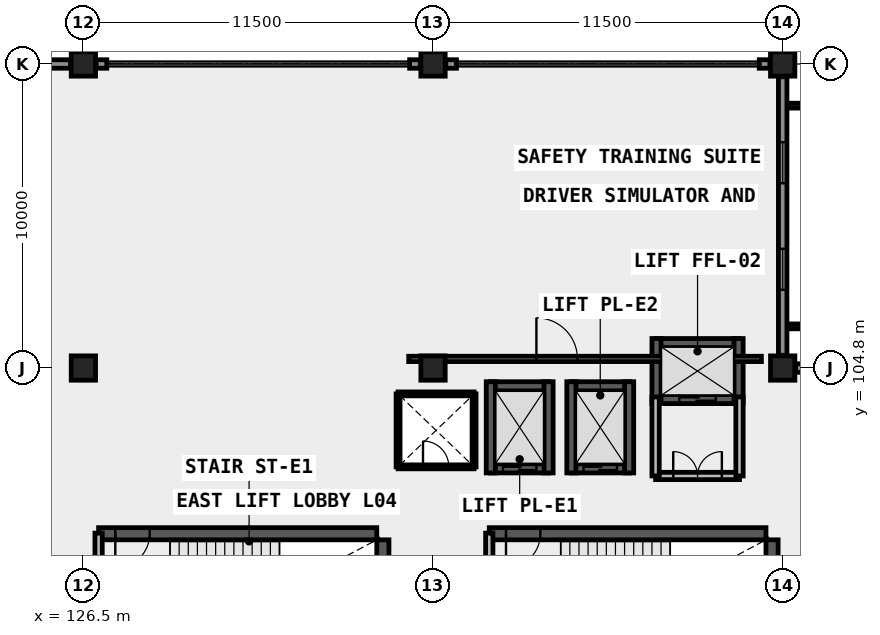
"""IFC4 building model, lengths in metres.
Left out: names, types, materials, properties, quantities, classifications, styles, units other than length and angle.
Written with IfcOpenShell. Run it as: python <this file> out.ifc"""

import sys

from ifc_helpers import new_model, si_unit, direction, frame, frame_2d, origin, origin_2d, place, context, subcontext, project, spatial, rectangle, extrude, element, fill, save


model = new_model("IFC4")
c1 = context("Model", 3, precision=1e-05, world=origin(), true_north=direction((0.0, 1.0)))
c2 = subcontext(c1, "Body", "Model", "MODEL_VIEW")
j1 = project(units=[si_unit("LENGTHUNIT", "METRE"), si_unit("PLANEANGLEUNIT", "RADIAN")], contexts=[c1])
p1 = place(None, origin())
s1 = spatial("IfcSite", under=j1, at=p1, CompositionType="ELEMENT")
p2 = place(p1, origin())
s2 = spatial("IfcBuilding", under=s1, at=p2, CompositionType="ELEMENT")
p3 = place(p2, frame((0.0, 0.0, 18.3)))
s3 = spatial("IfcBuildingStorey", under=s2, at=p3, CompositionType="ELEMENT", Elevation=18.3)
for number, where, z_axis, x_axis in (
    (1, (126.5, 104.8, 0.0), (0.0, 0.0, 1.0), (1.0, 0.0, 0.0)),
    (2, (126.5, 114.8, 0.0), (0.0, 0.0, 1.0), (1.0, 0.0, 0.0)),
    (3, (138.0, 104.8, 0.0), (0.0, 0.0, 1.0), (1.0, 0.0, 0.0)),
    (4, (138.0, 114.8, 0.0), (0.0, 0.0, 1.0), (1.0, 0.0, 0.0)),
    (5, (149.5, 104.8, 0.0), (0.0, 0.0, 1.0), (1.0, 0.0, 0.0)),
    (6, (149.5, 114.8, 0.0), (0.0, 0.0, 1.0), (1.0, 0.0, 0.0)),
):
    element("IfcColumn", number, at=place(p3, frame(where, z_axis=z_axis, x_axis=x_axis)), inside=s3, PredefinedType="COLUMN", context=c2, shape_type="SweptSolid", body=[
        extrude(rectangle(XDim=0.8, YDim=0.8, at=origin_2d()), origin(), (0.0, 0.0, 1.0), 4.16),
    ])
p4 = place(p3, frame((145.35, 103.78, 0.0), z_axis=(0.0, 0.0, 1.0), x_axis=(1.0, 0.0, 0.0)))
e7 = element("IfcWall", 7, at=p4, inside=s3, PredefinedType="SHEAR", context=c2, shape_type="SweptSolid", body=[
    extrude(rectangle(XDim=2.7, YDim=0.3, at=frame_2d((1.35, 0.0))), origin(), (0.0, 0.0, 1.0), 4.16),
])
p5 = place(p4, frame((0.75, 0.0, 0.0)))
e8 = element("IfcOpeningElement", 8, at=p5, cuts=e7, PredefinedType="OPENING", context=c2, shape_type="SweptSolid", body=[
    extrude(rectangle(XDim=1.2, YDim=2.15, at=frame_2d((0.6, 1.075))), frame((0.0, 0.16, 0.0), z_axis=(0.0, -1.0, 0.0), x_axis=(1.0, 0.0, 0.0)), (0.0, 0.0, 1.0), 0.32),
])
p6 = place(p3, frame((145.35, 105.62, 0.0), z_axis=(0.0, 0.0, 1.0), x_axis=(1.0, 0.0, 0.0)))
e9 = element("IfcWall", 9, at=p6, inside=s3, PredefinedType="SHEAR", context=c2, shape_type="SweptSolid", body=[
    extrude(rectangle(XDim=2.7, YDim=0.3, at=frame_2d((1.35, 0.0))), origin(), (0.0, 0.0, 1.0), 4.16),
])
for number, where, z_axis, x_axis in (
    (10, (145.35, 103.63, 0.0), (0.0, 0.0, 1.0), (0.0, 1.0, 0.0)),
    (11, (148.05, 103.63, 0.0), (0.0, 0.0, 1.0), (0.0, 1.0, 0.0)),
):
    element("IfcWall", number, at=place(p3, frame(where, z_axis=z_axis, x_axis=x_axis)), inside=s3, PredefinedType="SHEAR", context=c2, shape_type="SweptSolid", body=[
        extrude(rectangle(XDim=2.14, YDim=0.3, at=frame_2d((1.07, 0.0))), origin(), (0.0, 0.0, 1.0), 4.16),
    ])
p7 = place(p3, frame((139.9, 101.5, 0.0), z_axis=(0.0, 0.0, 1.0), x_axis=(1.0, 0.0, 0.0)))
e12 = element("IfcWall", 12, at=p7, inside=s3, PredefinedType="SHEAR", context=c2, shape_type="SweptSolid", body=[
    extrude(rectangle(XDim=1.9, YDim=0.3, at=frame_2d((0.95, 0.0))), origin(), (0.0, 0.0, 1.0), 4.16),
])
p8 = place(p7, frame((0.4, 0.0, 0.0)))
e13 = element("IfcOpeningElement", 13, at=p8, cuts=e12, PredefinedType="OPENING", context=c2, shape_type="SweptSolid", body=[
    extrude(rectangle(XDim=1.1, YDim=2.15, at=frame_2d((0.55, 1.075))), frame((0.0, 0.16, 0.0), z_axis=(0.0, -1.0, 0.0), x_axis=(1.0, 0.0, 0.0)), (0.0, 0.0, 1.0), 0.32),
])
p9 = place(p3, frame((139.9, 104.2, 0.0), z_axis=(0.0, 0.0, 1.0), x_axis=(1.0, 0.0, 0.0)))
e14 = element("IfcWall", 14, at=p9, inside=s3, PredefinedType="SHEAR", context=c2, shape_type="SweptSolid", body=[
    extrude(rectangle(XDim=1.9, YDim=0.3, at=frame_2d((0.95, 0.0))), origin(), (0.0, 0.0, 1.0), 4.16),
])
for number, where, z_axis, x_axis in (
    (15, (139.9, 101.35, 0.0), (0.0, 0.0, 1.0), (0.0, 1.0, 0.0)),
    (16, (141.8, 101.35, 0.0), (0.0, 0.0, 1.0), (0.0, 1.0, 0.0)),
):
    element("IfcWall", number, at=place(p3, frame(where, z_axis=z_axis, x_axis=x_axis)), inside=s3, PredefinedType="SHEAR", context=c2, shape_type="SweptSolid", body=[
        extrude(rectangle(XDim=3.0, YDim=0.3, at=frame_2d((1.5, 0.0))), origin(), (0.0, 0.0, 1.0), 4.16),
    ])
p10 = place(p3, frame((142.55, 101.5, 0.0), z_axis=(0.0, 0.0, 1.0), x_axis=(1.0, 0.0, 0.0)))
e17 = element("IfcWall", 17, at=p10, inside=s3, PredefinedType="SHEAR", context=c2, shape_type="SweptSolid", body=[
    extrude(rectangle(XDim=1.9, YDim=0.3, at=frame_2d((0.95, 0.0))), origin(), (0.0, 0.0, 1.0), 4.16),
])
p11 = place(p10, frame((0.4, 0.0, 0.0)))
e18 = element("IfcOpeningElement", 18, at=p11, cuts=e17, PredefinedType="OPENING", context=c2, shape_type="SweptSolid", body=[
    extrude(rectangle(XDim=1.1, YDim=2.15, at=frame_2d((0.55, 1.075))), frame((0.0, 0.16, 0.0), z_axis=(0.0, -1.0, 0.0), x_axis=(1.0, 0.0, 0.0)), (0.0, 0.0, 1.0), 0.32),
])
p12 = place(p3, frame((142.55, 104.2, 0.0), z_axis=(0.0, 0.0, 1.0), x_axis=(1.0, 0.0, 0.0)))
e19 = element("IfcWall", 19, at=p12, inside=s3, PredefinedType="SHEAR", context=c2, shape_type="SweptSolid", body=[
    extrude(rectangle(XDim=1.9, YDim=0.3, at=frame_2d((0.95, 0.0))), origin(), (0.0, 0.0, 1.0), 4.16),
])
for number, where, z_axis, x_axis in (
    (20, (142.55, 101.35, 0.0), (0.0, 0.0, 1.0), (0.0, 1.0, 0.0)),
    (21, (144.45, 101.35, 0.0), (0.0, 0.0, 1.0), (0.0, 1.0, 0.0)),
):
    element("IfcWall", number, at=place(p3, frame(where, z_axis=z_axis, x_axis=x_axis)), inside=s3, PredefinedType="SHEAR", context=c2, shape_type="SweptSolid", body=[
        extrude(rectangle(XDim=3.0, YDim=0.3, at=frame_2d((1.5, 0.0))), origin(), (0.0, 0.0, 1.0), 4.16),
    ])
p13 = place(p3, frame((127.0, 99.35, 0.0), z_axis=(0.0, 0.0, 1.0), x_axis=(1.0, 0.0, 0.0)))
e22 = element("IfcWall", 22, at=p13, inside=s3, PredefinedType="SHEAR", context=c2, shape_type="SweptSolid", body=[
    extrude(rectangle(XDim=9.15, YDim=0.4, at=frame_2d((4.575, 0.0))), origin(), (0.0, 0.0, 1.0), 4.16),
])
p14 = place(p13, frame((0.55, 0.0, 0.0)))
e23 = element("IfcOpeningElement", 23, at=p14, cuts=e22, PredefinedType="OPENING", context=c2, shape_type="SweptSolid", body=[
    extrude(rectangle(XDim=1.13, YDim=2.15, at=frame_2d((0.565, 1.075))), frame((0.0, 0.21, 0.0), z_axis=(0.0, -1.0, 0.0), x_axis=(1.0, 0.0, 0.0)), (0.0, 0.0, 1.0), 0.42),
])
p15 = place(p3, frame((136.35, 95.55, 0.0), z_axis=(0.0, 0.0, 1.0), x_axis=(0.0, 1.0, 0.0)))
e24 = element("IfcWall", 24, at=p15, inside=s3, PredefinedType="SHEAR", context=c2, shape_type="SweptSolid", body=[
    extrude(rectangle(XDim=3.6, YDim=0.4, at=frame_2d((1.8, 0.0))), origin(), (0.0, 0.0, 1.0), 4.16),
])
p16 = place(p3, frame((139.85, 99.35, 0.0), z_axis=(0.0, 0.0, 1.0), x_axis=(1.0, 0.0, 0.0)))
e25 = element("IfcWall", 25, at=p16, inside=s3, PredefinedType="SHEAR", context=c2, shape_type="SweptSolid", body=[
    extrude(rectangle(XDim=9.1, YDim=0.4, at=frame_2d((4.55, 0.0))), origin(), (0.0, 0.0, 1.0), 4.16),
])
p17 = place(p16, frame((0.55, 0.0, 0.0)))
e26 = element("IfcOpeningElement", 26, at=p17, cuts=e25, PredefinedType="OPENING", context=c2, shape_type="SweptSolid", body=[
    extrude(rectangle(XDim=1.13, YDim=2.15, at=frame_2d((0.565, 1.075))), frame((0.0, 0.21, 0.0), z_axis=(0.0, -1.0, 0.0), x_axis=(1.0, 0.0, 0.0)), (0.0, 0.0, 1.0), 0.42),
])
p18 = place(p3, frame((149.15, 95.22, 0.0), z_axis=(0.0, 0.0, 1.0), x_axis=(0.0, 1.0, 0.0)))
e27 = element("IfcWall", 27, at=p18, inside=s3, PredefinedType="SHEAR", context=c2, shape_type="SweptSolid", body=[
    extrude(rectangle(XDim=3.93, YDim=0.4, at=frame_2d((1.965, 0.0))), origin(), (0.0, 0.0, 1.0), 4.16),
])
p19 = place(p3, frame((149.92, 104.8, 0.0), z_axis=(0.0, 0.0, 1.0), x_axis=(1.0, 0.0, 0.0)))
e28 = element("IfcWall", 28, at=p19, inside=s3, PredefinedType="SOLIDWALL", context=c2, shape_type="SweptSolid", body=[
    extrude(rectangle(XDim=10.66, YDim=0.28, at=frame_2d((5.33, 0.0))), origin(), (0.0, 0.0, 1.0), 3.1),
])
p20 = place(p19, frame((2.587, 0.0, 0.85)))
e29 = element("IfcOpeningElement", 29, at=p20, cuts=e28, PredefinedType="OPENING", context=c2, shape_type="SweptSolid", body=[
    extrude(rectangle(XDim=1.45, YDim=1.75, at=frame_2d((0.725, 0.875))), frame((0.0, 0.15, 0.0), z_axis=(0.0, -1.0, 0.0), x_axis=(1.0, 0.0, 0.0)), (0.0, 0.0, 1.0), 0.3),
])
p21 = place(p19, frame((6.623, 0.0, 0.85)))
e30 = element("IfcOpeningElement", 30, at=p21, cuts=e28, PredefinedType="OPENING", context=c2, shape_type="SweptSolid", body=[
    extrude(rectangle(XDim=1.45, YDim=1.75, at=frame_2d((0.725, 0.875))), frame((0.0, 0.15, 0.0), z_axis=(0.0, -1.0, 0.0), x_axis=(1.0, 0.0, 0.0)), (0.0, 0.0, 1.0), 0.3),
])
p22 = place(p3, frame((149.5, 105.22, 0.0), z_axis=(0.0, 0.0, 1.0), x_axis=(0.0, 1.0, 0.0)))
e31 = element("IfcWall", 31, at=p22, inside=s3, PredefinedType="SOLIDWALL", context=c2, shape_type="SweptSolid", body=[
    extrude(rectangle(XDim=9.16, YDim=0.28, at=frame_2d((4.58, 0.0))), origin(), (0.0, 0.0, 1.0), 3.1),
])
p23 = place(p22, frame((2.153, 0.0, 0.85)))
e32 = element("IfcOpeningElement", 32, at=p23, cuts=e31, PredefinedType="OPENING", context=c2, shape_type="SweptSolid", body=[
    extrude(rectangle(XDim=1.35, YDim=1.65, at=frame_2d((0.675, 0.825))), frame((0.0, 0.15, 0.0), z_axis=(0.0, -1.0, 0.0), x_axis=(1.0, 0.0, 0.0)), (0.0, 0.0, 1.0), 0.3),
])
p24 = place(p22, frame((5.657, 0.0, 0.85)))
e33 = element("IfcOpeningElement", 33, at=p24, cuts=e31, PredefinedType="OPENING", context=c2, shape_type="SweptSolid", body=[
    extrude(rectangle(XDim=1.35, YDim=1.65, at=frame_2d((0.675, 0.825))), frame((0.0, 0.15, 0.0), z_axis=(0.0, -1.0, 0.0), x_axis=(1.0, 0.0, 0.0)), (0.0, 0.0, 1.0), 0.3),
])
p25 = place(p3, frame((115.42, 114.8, 0.0), z_axis=(0.0, 0.0, 1.0), x_axis=(1.0, 0.0, 0.0)))
e34 = element("IfcWall", 34, at=p25, inside=s3, PredefinedType="SOLIDWALL", context=c2, shape_type="SweptSolid", body=[
    extrude(rectangle(XDim=10.66, YDim=0.28, at=frame_2d((5.33, 0.0))), origin(), (0.0, 0.0, 1.0), 3.1),
])
p26 = place(p25, frame((2.587, 0.0, 0.85)))
e35 = element("IfcOpeningElement", 35, at=p26, cuts=e34, PredefinedType="OPENING", context=c2, shape_type="SweptSolid", body=[
    extrude(rectangle(XDim=1.45, YDim=1.75, at=frame_2d((0.725, 0.875))), frame((0.0, 0.15, 0.0), z_axis=(0.0, -1.0, 0.0), x_axis=(1.0, 0.0, 0.0)), (0.0, 0.0, 1.0), 0.3),
])
p27 = place(p25, frame((6.623, 0.0, 0.85)))
e36 = element("IfcOpeningElement", 36, at=p27, cuts=e34, PredefinedType="OPENING", context=c2, shape_type="SweptSolid", body=[
    extrude(rectangle(XDim=1.45, YDim=1.75, at=frame_2d((0.725, 0.875))), frame((0.0, 0.15, 0.0), z_axis=(0.0, -1.0, 0.0), x_axis=(1.0, 0.0, 0.0)), (0.0, 0.0, 1.0), 0.3),
])
for number, where, z_axis, x_axis in (
    (37, (126.92, 114.8, 0.0), (0.0, 0.0, 1.0), (1.0, 0.0, 0.0)),
    (38, (137.23, 114.8, 0.0), (0.0, 0.0, 1.0), (1.0, 0.0, 0.0)),
    (39, (138.42, 114.8, 0.0), (0.0, 0.0, 1.0), (1.0, 0.0, 0.0)),
    (40, (148.73, 114.8, 0.0), (0.0, 0.0, 1.0), (1.0, 0.0, 0.0)),
):
    element("IfcWall", number, at=place(p3, frame(where, z_axis=z_axis, x_axis=x_axis)), inside=s3, PredefinedType="SOLIDWALL", context=c2, shape_type="SweptSolid", body=[
        extrude(rectangle(XDim=0.35, YDim=0.28, at=frame_2d((0.175, 0.0))), origin(), (0.0, 0.0, 1.0), 3.89),
    ])
p28 = place(p3, frame((127.0, 95.33, 0.0), z_axis=(0.0, 0.0, 1.0), x_axis=(0.0, 1.0, 0.0)))
e41 = element("IfcWall", 41, at=p28, inside=s3, PredefinedType="SOLIDWALL", context=c2, shape_type="SweptSolid", body=[
    extrude(rectangle(XDim=4.04, YDim=0.24, at=frame_2d((2.02, 0.0))), origin(), (0.0, 0.0, 1.0), 3.88),
])
p29 = place(p28, frame((1.45, 0.0, 0.0)))
e42 = element("IfcOpeningElement", 42, at=p29, cuts=e41, PredefinedType="OPENING", context=c2, shape_type="SweptSolid", body=[
    extrude(rectangle(XDim=1.13, YDim=2.15, at=frame_2d((0.565, 1.075))), frame((0.0, 0.13, 0.0), z_axis=(0.0, -1.0, 0.0), x_axis=(1.0, 0.0, 0.0)), (0.0, 0.0, 1.0), 0.26),
])
p30 = place(p3, frame((139.85, 95.33, 0.0), z_axis=(0.0, 0.0, 1.0), x_axis=(0.0, 1.0, 0.0)))
e43 = element("IfcWall", 43, at=p30, inside=s3, PredefinedType="SOLIDWALL", context=c2, shape_type="SweptSolid", body=[
    extrude(rectangle(XDim=4.04, YDim=0.24, at=frame_2d((2.02, 0.0))), origin(), (0.0, 0.0, 1.0), 3.88),
])
p31 = place(p30, frame((1.45, 0.0, 0.0)))
e44 = element("IfcOpeningElement", 44, at=p31, cuts=e43, PredefinedType="OPENING", context=c2, shape_type="SweptSolid", body=[
    extrude(rectangle(XDim=1.13, YDim=2.15, at=frame_2d((0.565, 1.075))), frame((0.0, 0.13, 0.0), z_axis=(0.0, -1.0, 0.0), x_axis=(1.0, 0.0, 0.0)), (0.0, 0.0, 1.0), 0.26),
])
p32 = place(p3, frame((145.32, 101.25, 0.0), z_axis=(0.0, 0.0, 1.0), x_axis=(1.0, 0.0, 0.0)))
e45 = element("IfcWall", 45, at=p32, inside=s3, PredefinedType="SOLIDWALL", context=c2, shape_type="SweptSolid", body=[
    extrude(rectangle(XDim=2.76, YDim=0.24, at=frame_2d((1.38, 0.0))), origin(), (0.0, 0.0, 1.0), 3.88),
])
p33 = place(p32, frame((0.58, 0.0, 0.0)))
e46 = element("IfcOpeningElement", 46, at=p33, cuts=e45, PredefinedType="OPENING", context=c2, shape_type="SweptSolid", body=[
    extrude(rectangle(XDim=1.6, YDim=2.15, at=frame_2d((0.8, 1.075))), frame((0.0, 0.13, 0.0), z_axis=(0.0, -1.0, 0.0), x_axis=(1.0, 0.0, 0.0)), (0.0, 0.0, 1.0), 0.26),
])
for number, where, z_axis, x_axis in (
    (47, (145.32, 101.25, 0.0), (0.0, 0.0, 1.0), (0.0, 1.0, 0.0)),
    (48, (148.08, 101.25, 0.0), (0.0, 0.0, 1.0), (0.0, 1.0, 0.0)),
):
    element("IfcWall", number, at=place(p3, frame(where, z_axis=z_axis, x_axis=x_axis)), inside=s3, PredefinedType="SOLIDWALL", context=c2, shape_type="SweptSolid", body=[
        extrude(rectangle(XDim=2.6, YDim=0.24, at=frame_2d((1.3, 0.0))), origin(), (0.0, 0.0, 1.0), 3.88),
    ])
p34 = place(p3, frame((136.85, 101.55, 0.0), z_axis=(0.0, 0.0, 1.0), x_axis=(1.0, 0.0, 0.0)))
e49 = element("IfcWall", 49, at=p34, inside=s3, PredefinedType="PLUMBINGWALL", context=c2, shape_type="SweptSolid", body=[
    extrude(rectangle(XDim=2.5, YDim=0.13, at=frame_2d((1.25, 0.0))), origin(), (0.0, 0.0, 1.0), 3.88),
])
p35 = place(p34, frame((0.82, 0.0, 0.0)))
e50 = element("IfcOpeningElement", 50, at=p35, cuts=e49, PredefinedType="OPENING", context=c2, shape_type="SweptSolid", body=[
    extrude(rectangle(XDim=0.85, YDim=2.0, at=frame_2d((0.425, 1.0))), frame((0.0, 0.075, 0.0), z_axis=(0.0, -1.0, 0.0), x_axis=(1.0, 0.0, 0.0)), (0.0, 0.0, 1.0), 0.15),
])
for number, where, z_axis, x_axis in (
    (51, (136.85, 101.55, 0.0), (0.0, 0.0, 1.0), (0.0, 1.0, 0.0)),
    (52, (139.35, 101.55, 0.0), (0.0, 0.0, 1.0), (0.0, 1.0, 0.0)),
):
    element("IfcWall", number, at=place(p3, frame(where, z_axis=z_axis, x_axis=x_axis)), inside=s3, PredefinedType="PLUMBINGWALL", context=c2, shape_type="SweptSolid", body=[
        extrude(rectangle(XDim=2.4, YDim=0.13, at=frame_2d((1.2, 0.0))), origin(), (0.0, 0.0, 1.0), 3.88),
    ])
p36 = place(p3, frame((136.85, 103.95, 0.0), z_axis=(0.0, 0.0, 1.0), x_axis=(1.0, 0.0, 0.0)))
e53 = element("IfcWall", 53, at=p36, inside=s3, PredefinedType="PLUMBINGWALL", context=c2, shape_type="SweptSolid", body=[
    extrude(rectangle(XDim=2.5, YDim=0.13, at=frame_2d((1.25, 0.0))), origin(), (0.0, 0.0, 1.0), 3.88),
])
p37 = place(p3, frame((137.2, 105.1, 0.0), z_axis=(0.0, 0.0, 1.0), x_axis=(1.0, 0.0, 0.0)))
e54 = element("IfcWall", 54, at=p37, inside=s3, PredefinedType="PARTITIONING", context=c2, shape_type="SweptSolid", body=[
    extrude(rectangle(XDim=11.6, YDim=0.175, at=frame_2d((5.8, 0.0))), origin(), (0.0, 0.0, 1.0), 3.88),
])
p38 = place(p37, frame((4.2, 0.0, 0.0)))
e55 = element("IfcOpeningElement", 55, at=p38, cuts=e54, PredefinedType="OPENING", context=c2, shape_type="SweptSolid", body=[
    extrude(rectangle(XDim=1.35, YDim=2.2, at=frame_2d((0.675, 1.1))), frame((0.0, 0.098, 0.0), z_axis=(0.0, -1.0, 0.0), x_axis=(1.0, 0.0, 0.0)), (0.0, 0.0, 1.0), 0.195),
])
p39 = place(p23, origin())
e56 = element("IfcWindow", 56, at=p39, inside=s3, PartitioningType="SINGLE_PANEL", PredefinedType="WINDOW", context=c2, shape_type="SweptSolid", body=[
    extrude(rectangle(XDim=1.35, YDim=1.65, at=frame_2d((0.675, 0.825))), frame((0.0, 0.03, 0.0), z_axis=(0.0, -1.0, 0.0), x_axis=(1.0, 0.0, 0.0)), (0.0, 0.0, 1.0), 0.06),
])
fill(e32, e56)
p40 = place(p24, origin())
e57 = element("IfcWindow", 57, at=p40, inside=s3, PartitioningType="SINGLE_PANEL", PredefinedType="WINDOW", context=c2, shape_type="SweptSolid", body=[
    extrude(rectangle(XDim=1.35, YDim=1.65, at=frame_2d((0.675, 0.825))), frame((0.0, 0.03, 0.0), z_axis=(0.0, -1.0, 0.0), x_axis=(1.0, 0.0, 0.0)), (0.0, 0.0, 1.0), 0.06),
])
fill(e33, e57)
p41 = place(p5, origin())
e58 = element("IfcDoor", 58, at=p41, inside=s3, OperationType="SLIDING_TO_RIGHT", PredefinedType="DOOR", context=c2, shape_type="SweptSolid", body=[
    extrude(rectangle(XDim=1.2, YDim=2.15, at=frame_2d((0.6, 1.075))), frame((0.0, 0.025, 0.0), z_axis=(0.0, -1.0, 0.0), x_axis=(1.0, 0.0, 0.0)), (0.0, 0.0, 1.0), 0.05),
])
fill(e8, e58)
p42 = place(p8, origin())
e59 = element("IfcDoor", 59, at=p42, inside=s3, OperationType="SLIDING_TO_LEFT", PredefinedType="DOOR", context=c2, shape_type="SweptSolid", body=[
    extrude(rectangle(XDim=1.1, YDim=2.15, at=frame_2d((0.55, 1.075))), frame((0.0, 0.025, 0.0), z_axis=(0.0, -1.0, 0.0), x_axis=(1.0, 0.0, 0.0)), (0.0, 0.0, 1.0), 0.05),
])
fill(e13, e59)
p43 = place(p11, origin())
e60 = element("IfcDoor", 60, at=p43, inside=s3, OperationType="SLIDING_TO_LEFT", PredefinedType="DOOR", context=c2, shape_type="SweptSolid", body=[
    extrude(rectangle(XDim=1.1, YDim=2.15, at=frame_2d((0.55, 1.075))), frame((0.0, 0.025, 0.0), z_axis=(0.0, -1.0, 0.0), x_axis=(1.0, 0.0, 0.0)), (0.0, 0.0, 1.0), 0.05),
])
fill(e18, e60)
p44 = place(p14, frame((0.565, 0.0, 0.0), z_axis=(0.0, 0.0, 1.0), x_axis=(-1.0, 0.0, 0.0)))
e61 = element("IfcDoor", 61, at=p44, inside=s3, OperationType="SINGLE_SWING_LEFT", PredefinedType="DOOR", context=c2, shape_type="SweptSolid", body=[
    extrude(rectangle(XDim=1.13, YDim=2.15, at=frame_2d((0.0, 1.075))), frame((0.0, 0.025, 0.0), z_axis=(0.0, -1.0, 0.0), x_axis=(1.0, 0.0, 0.0)), (0.0, 0.0, 1.0), 0.05),
])
fill(e23, e61)
p45 = place(p17, frame((0.565, 0.0, 0.0), z_axis=(0.0, 0.0, 1.0), x_axis=(-1.0, 0.0, 0.0)))
e62 = element("IfcDoor", 62, at=p45, inside=s3, OperationType="SINGLE_SWING_LEFT", PredefinedType="DOOR", context=c2, shape_type="SweptSolid", body=[
    extrude(rectangle(XDim=1.13, YDim=2.15, at=frame_2d((0.0, 1.075))), frame((0.0, 0.025, 0.0), z_axis=(0.0, -1.0, 0.0), x_axis=(1.0, 0.0, 0.0)), (0.0, 0.0, 1.0), 0.05),
])
fill(e26, e62)
p46 = place(p33, origin())
e63 = element("IfcDoor", 63, at=p46, inside=s3, OperationType="DOUBLE_DOOR_SINGLE_SWING", PredefinedType="DOOR", context=c2, shape_type="SweptSolid", body=[
    extrude(rectangle(XDim=1.6, YDim=2.15, at=frame_2d((0.8, 1.075))), frame((0.0, 0.025, 0.0), z_axis=(0.0, -1.0, 0.0), x_axis=(1.0, 0.0, 0.0)), (0.0, 0.0, 1.0), 0.05),
])
fill(e46, e63)
p47 = place(p35, origin())
e64 = element("IfcDoor", 64, at=p47, inside=s3, OperationType="SINGLE_SWING_LEFT", PredefinedType="TRAPDOOR", context=c2, shape_type="SweptSolid", body=[
    extrude(rectangle(XDim=0.85, YDim=2.0, at=frame_2d((0.425, 1.0))), frame((0.0, 0.025, 0.0), z_axis=(0.0, -1.0, 0.0), x_axis=(1.0, 0.0, 0.0)), (0.0, 0.0, 1.0), 0.05),
])
fill(e50, e64)
p48 = place(p38, origin())
e65 = element("IfcDoor", 65, at=p48, inside=s3, OperationType="SINGLE_SWING_LEFT", PredefinedType="DOOR", context=c2, shape_type="SweptSolid", body=[
    extrude(rectangle(XDim=1.35, YDim=2.2, at=frame_2d((0.675, 1.1))), frame((0.0, 0.025, 0.0), z_axis=(0.0, -1.0, 0.0), x_axis=(1.0, 0.0, 0.0)), (0.0, 0.0, 1.0), 0.05),
])
fill(e55, e65)
save(model, sys.argv[1])
